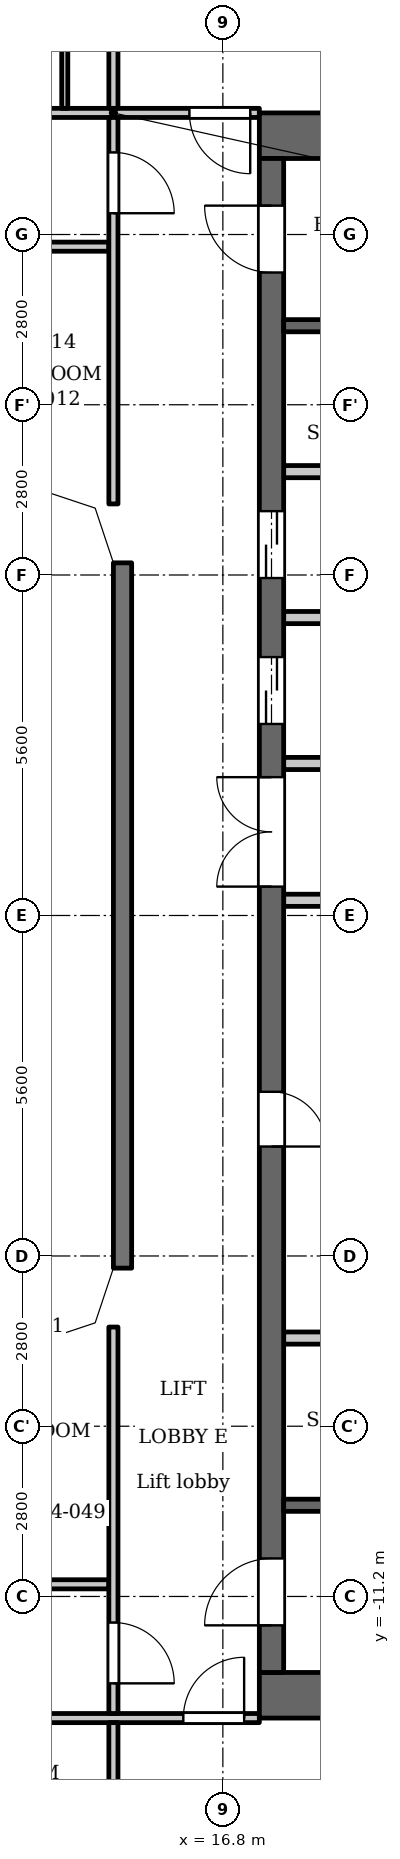
"""IFC4 building model, lengths in metres.
Left out: names, types, materials, properties, quantities, classifications, styles, units other than length and angle.
Written with IfcOpenShell. Run it as: python <this file> out.ifc"""

import sys

from ifc_helpers import new_model, si_unit, direction, frame, frame_2d, origin, place, context, subcontext, project, spatial, polyline, rectangle, outline, extrude, element, fill, save


model = new_model("IFC4")
c1 = context("Model", 3, precision=1e-05, world=origin(), true_north=direction((0.0, 1.0)))
c2 = subcontext(c1, "Body", "Model", "MODEL_VIEW")
j1 = project(units=[si_unit("LENGTHUNIT", "METRE"), si_unit("PLANEANGLEUNIT", "RADIAN")], contexts=[c1])
p1 = place(None, origin())
s1 = spatial("IfcSite", under=j1, at=p1, CompositionType="ELEMENT")
p2 = place(p1, origin())
s2 = spatial("IfcBuilding", under=s1, at=p2, CompositionType="ELEMENT")
p3 = place(p2, frame((0.0, 0.0, 171.1)))
s3 = spatial("IfcBuildingStorey", under=s2, at=p3, CompositionType="ELEMENT", Elevation=171.1)
p4 = place(p3, frame((15.15, 5.8, 0.0), z_axis=(0.0, 0.0, 1.0), x_axis=(0.0, -1.0, 0.0)))
e1 = element("IfcWall", 1, at=p4, inside=s3, PredefinedType="SOLIDWALL", context=c2, shape_type="SweptSolid", body=[
    extrude(rectangle(XDim=11.6, YDim=0.3, at=frame_2d((5.8, 0.0))), origin(), (0.0, 0.0, 1.0), 3.2),
])
for number, where, z_axis, x_axis in (
    (2, (17.4, 12.825, 0.0), (0.0, 0.0, 1.0), (1.0, 0.0, 0.0)),
    (3, (17.4, -12.825, 0.0), (0.0, 0.0, 1.0), (1.0, 0.0, 0.0)),
):
    element("IfcWall", number, at=place(p3, frame(where, z_axis=z_axis, x_axis=x_axis)), inside=s3, PredefinedType="SHEAR", context=c2, shape_type="SweptSolid", body=[
        extrude(rectangle(XDim=10.4, YDim=0.75, at=frame_2d((5.2, 0.0))), origin(), (0.0, 0.0, 1.0), 3.2),
    ])
p5 = place(p3, frame((17.6, -12.45, 0.0), z_axis=(0.0, 0.0, 1.0), x_axis=(0.0, 1.0, 0.0)))
e4 = element("IfcWall", 4, at=p5, inside=s3, PredefinedType="SHEAR", context=c2, shape_type="SweptSolid", body=[
    extrude(rectangle(XDim=24.9, YDim=0.4, at=frame_2d((12.45, 0.0))), origin(), (0.0, 0.0, 1.0), 3.2),
])
p6 = place(p5, frame((8.65, 0.0, 0.0)))
e5 = element("IfcOpeningElement", 5, at=p6, cuts=e4, PredefinedType="OPENING", context=c2, shape_type="SweptSolid", body=[
    extrude(rectangle(XDim=0.9, YDim=2.1, at=frame_2d((0.45, 1.05))), frame((0.0, 0.21, 0.0), z_axis=(0.0, -1.0, 0.0), x_axis=(1.0, 0.0, 0.0)), (0.0, 0.0, 1.0), 0.42),
])
p7 = place(p5, frame((15.6, 0.0, 0.0)))
e6 = element("IfcOpeningElement", 6, at=p7, cuts=e4, PredefinedType="OPENING", context=c2, shape_type="SweptSolid", body=[
    extrude(rectangle(XDim=1.1, YDim=2.1, at=frame_2d((0.55, 1.05))), frame((0.0, 0.21, 0.0), z_axis=(0.0, -1.0, 0.0), x_axis=(1.0, 0.0, 0.0)), (0.0, 0.0, 1.0), 0.42),
])
p8 = place(p5, frame((18.0, 0.0, 0.0)))
e7 = element("IfcOpeningElement", 7, at=p8, cuts=e4, PredefinedType="OPENING", context=c2, shape_type="SweptSolid", body=[
    extrude(rectangle(XDim=1.1, YDim=2.1, at=frame_2d((0.55, 1.05))), frame((0.0, 0.21, 0.0), z_axis=(0.0, -1.0, 0.0), x_axis=(1.0, 0.0, 0.0)), (0.0, 0.0, 1.0), 0.42),
])
p9 = place(p5, frame((23.025, 0.0, 0.0)))
e8 = element("IfcOpeningElement", 8, at=p9, cuts=e4, PredefinedType="OPENING", context=c2, shape_type="SweptSolid", body=[
    extrude(rectangle(XDim=1.1, YDim=2.1, at=frame_2d((0.55, 1.05))), frame((0.0, 0.21, 0.0), z_axis=(0.0, -1.0, 0.0), x_axis=(1.0, 0.0, 0.0)), (0.0, 0.0, 1.0), 0.42),
])
p10 = place(p5, frame((0.775, 0.0, 0.0)))
e9 = element("IfcOpeningElement", 9, at=p10, cuts=e4, PredefinedType="OPENING", context=c2, shape_type="SweptSolid", body=[
    extrude(rectangle(XDim=1.1, YDim=2.1, at=frame_2d((0.55, 1.05))), frame((0.0, 0.21, 0.0), z_axis=(0.0, -1.0, 0.0), x_axis=(1.0, 0.0, 0.0)), (0.0, 0.0, 1.0), 0.42),
])
p11 = place(p5, frame((12.925, 0.0, 0.0)))
e10 = element("IfcOpeningElement", 10, at=p11, cuts=e4, PredefinedType="OPENING", context=c2, shape_type="SweptSolid", body=[
    extrude(rectangle(XDim=1.8, YDim=2.1, at=frame_2d((0.9, 1.05))), frame((0.0, 0.21, 0.0), z_axis=(0.0, -1.0, 0.0), x_axis=(1.0, 0.0, 0.0)), (0.0, 0.0, 1.0), 0.42),
])
p12 = place(p3, frame((17.8, -9.7, 0.0), z_axis=(0.0, 0.0, 1.0), x_axis=(1.0, 0.0, 0.0)))
e11 = element("IfcWall", 11, at=p12, inside=s3, PredefinedType="SHEAR", context=c2, shape_type="SweptSolid", body=[
    extrude(rectangle(XDim=8.45, YDim=0.2, at=frame_2d((4.225, 0.0))), origin(), (0.0, 0.0, 1.0), 3.2),
])
p13 = place(p12, frame((0.85, 0.0, 0.0)))
e12 = element("IfcOpeningElement", 12, at=p13, cuts=e11, PredefinedType="OPENING", context=c2, shape_type="SweptSolid", body=[
    extrude(rectangle(XDim=1.1, YDim=2.1, at=frame_2d((0.55, 1.05))), frame((0.0, 0.11, 0.0), z_axis=(0.0, -1.0, 0.0), x_axis=(1.0, 0.0, 0.0)), (0.0, 0.0, 1.0), 0.22),
])
p14 = place(p12, frame((3.75, 0.0, 0.0)))
e13 = element("IfcOpeningElement", 13, at=p14, cuts=e11, PredefinedType="OPENING", context=c2, shape_type="SweptSolid", body=[
    extrude(rectangle(XDim=1.1, YDim=2.1, at=frame_2d((0.55, 1.05))), frame((0.0, 0.11, 0.0), z_axis=(0.0, -1.0, 0.0), x_axis=(1.0, 0.0, 0.0)), (0.0, 0.0, 1.0), 0.22),
])
p15 = place(p3, frame((17.8, -6.95, 0.0), z_axis=(0.0, 0.0, 1.0), x_axis=(1.0, 0.0, 0.0)))
e14 = element("IfcWall", 14, at=p15, inside=s3, PredefinedType="PARTITIONING", context=c2, shape_type="SweptSolid", body=[
    extrude(rectangle(XDim=2.8, YDim=0.2, at=frame_2d((1.4, 0.0))), origin(), (0.0, 0.0, 1.0), 3.2),
])
p16 = place(p3, frame((17.8, 0.25, 0.0), z_axis=(0.0, 0.0, 1.0), x_axis=(1.0, 0.0, 0.0)))
e15 = element("IfcWall", 15, at=p16, inside=s3, PredefinedType="PARTITIONING", context=c2, shape_type="SweptSolid", body=[
    extrude(rectangle(XDim=3.0, YDim=0.2, at=frame_2d((1.5, 0.0))), origin(), (0.0, 0.0, 1.0), 3.2),
])
p17 = place(p16, frame((1.98, 0.0, 0.0)))
e16 = element("IfcOpeningElement", 16, at=p17, cuts=e15, PredefinedType="OPENING", context=c2, shape_type="SweptSolid", body=[
    extrude(rectangle(XDim=0.9, YDim=2.1, at=frame_2d((0.45, 1.05))), frame((0.0, 0.11, 0.0), z_axis=(0.0, -1.0, 0.0), x_axis=(1.0, 0.0, 0.0)), (0.0, 0.0, 1.0), 0.22),
])
p18 = place(p3, frame((17.8, 2.5, 0.0), z_axis=(0.0, 0.0, 1.0), x_axis=(1.0, 0.0, 0.0)))
e17 = element("IfcWall", 17, at=p18, inside=s3, PredefinedType="PARTITIONING", context=c2, shape_type="SweptSolid", body=[
    extrude(rectangle(XDim=3.0, YDim=0.2, at=frame_2d((1.5, 0.0))), origin(), (0.0, 0.0, 1.0), 3.2),
])
for number, where, z_axis, x_axis in (
    (18, (17.8, 4.9, 0.0), (0.0, 0.0, 1.0), (1.0, 0.0, 0.0)),
    (19, (17.8, 7.3, 0.0), (0.0, 0.0, 1.0), (1.0, 0.0, 0.0)),
):
    element("IfcWall", number, at=place(p3, frame(where, z_axis=z_axis, x_axis=x_axis)), inside=s3, PredefinedType="PARTITIONING", context=c2, shape_type="SweptSolid", body=[
        extrude(rectangle(XDim=2.8, YDim=0.2, at=frame_2d((1.4, 0.0))), origin(), (0.0, 0.0, 1.0), 3.2),
    ])
p19 = place(p3, frame((17.8, 9.7, 0.0), z_axis=(0.0, 0.0, 1.0), x_axis=(1.0, 0.0, 0.0)))
e20 = element("IfcWall", 20, at=p19, inside=s3, PredefinedType="SHEAR", context=c2, shape_type="SweptSolid", body=[
    extrude(rectangle(XDim=8.45, YDim=0.2, at=frame_2d((4.225, 0.0))), origin(), (0.0, 0.0, 1.0), 3.2),
])
p20 = place(p19, frame((0.85, 0.0, 0.0)))
e21 = element("IfcOpeningElement", 21, at=p20, cuts=e20, PredefinedType="OPENING", context=c2, shape_type="SweptSolid", body=[
    extrude(rectangle(XDim=1.1, YDim=2.1, at=frame_2d((0.55, 1.05))), frame((0.0, 0.11, 0.0), z_axis=(0.0, -1.0, 0.0), x_axis=(1.0, 0.0, 0.0)), (0.0, 0.0, 1.0), 0.22),
])
p21 = place(p19, frame((3.75, 0.0, 0.0)))
e22 = element("IfcOpeningElement", 22, at=p21, cuts=e20, PredefinedType="OPENING", context=c2, shape_type="SweptSolid", body=[
    extrude(rectangle(XDim=1.1, YDim=2.1, at=frame_2d((0.55, 1.05))), frame((0.0, 0.11, 0.0), z_axis=(0.0, -1.0, 0.0), x_axis=(1.0, 0.0, 0.0)), (0.0, 0.0, 1.0), 0.22),
])
p22 = place(p3, frame((-17.4, -13.2, 0.0), z_axis=(0.0, 0.0, 1.0), x_axis=(1.0, 0.0, 0.0)))
e23 = element("IfcWall", 23, at=p22, inside=s3, PredefinedType="PARTITIONING", context=c2, shape_type="SweptSolid", body=[
    extrude(rectangle(XDim=34.8, YDim=0.15, at=frame_2d((17.4, 0.0))), origin(), (0.0, 0.0, 1.0), 3.2),
])
p23 = place(p22, frame((0.15, 0.0, 0.0)))
e24 = element("IfcOpeningElement", 24, at=p23, cuts=e23, PredefinedType="OPENING", context=c2, shape_type="SweptSolid", body=[
    extrude(rectangle(XDim=1.0, YDim=2.1, at=frame_2d((0.5, 1.05))), frame((0.0, 0.085, 0.0), z_axis=(0.0, -1.0, 0.0), x_axis=(1.0, 0.0, 0.0)), (0.0, 0.0, 1.0), 0.17),
])
p24 = place(p22, frame((33.55, 0.0, 0.0)))
e25 = element("IfcOpeningElement", 25, at=p24, cuts=e23, PredefinedType="OPENING", context=c2, shape_type="SweptSolid", body=[
    extrude(rectangle(XDim=1.0, YDim=2.1, at=frame_2d((0.5, 1.05))), frame((0.0, 0.085, 0.0), z_axis=(0.0, -1.0, 0.0), x_axis=(1.0, 0.0, 0.0)), (0.0, 0.0, 1.0), 0.17),
])
p25 = place(p22, frame((15.7, 0.0, 0.0)))
e26 = element("IfcOpeningElement", 26, at=p25, cuts=e23, PredefinedType="OPENING", context=c2, shape_type="SweptSolid", body=[
    extrude(rectangle(XDim=1.0, YDim=2.1, at=frame_2d((0.5, 1.05))), frame((0.0, 0.085, 0.0), z_axis=(0.0, -1.0, 0.0), x_axis=(1.0, 0.0, 0.0)), (0.0, 0.0, 1.0), 0.17),
])
p26 = place(p22, frame((26.9, 0.0, 0.0)))
e27 = element("IfcOpeningElement", 27, at=p26, cuts=e23, PredefinedType="OPENING", context=c2, shape_type="SweptSolid", body=[
    extrude(rectangle(XDim=1.0, YDim=2.1, at=frame_2d((0.5, 1.05))), frame((0.0, 0.085, 0.0), z_axis=(0.0, -1.0, 0.0), x_axis=(1.0, 0.0, 0.0)), (0.0, 0.0, 1.0), 0.17),
])
p27 = place(p3, frame((-14.925, -11.0, 0.0), z_axis=(0.0, 0.0, 1.0), x_axis=(1.0, 0.0, 0.0)))
e28 = element("IfcWall", 28, at=p27, inside=s3, PredefinedType="PARTITIONING", context=c2, shape_type="SweptSolid", body=[
    extrude(rectangle(XDim=29.85, YDim=0.15, at=frame_2d((14.925, 0.0))), origin(), (0.0, 0.0, 1.0), 3.2),
])
p28 = place(p27, frame((9.875, 0.0, 0.0)))
e29 = element("IfcOpeningElement", 29, at=p28, cuts=e28, PredefinedType="OPENING", context=c2, shape_type="SweptSolid", body=[
    extrude(rectangle(XDim=1.0, YDim=2.1, at=frame_2d((0.5, 1.05))), frame((0.0, 0.085, 0.0), z_axis=(0.0, -1.0, 0.0), x_axis=(1.0, 0.0, 0.0)), (0.0, 0.0, 1.0), 0.17),
])
p29 = place(p27, frame((17.875, 0.0, 0.0)))
e30 = element("IfcOpeningElement", 30, at=p29, cuts=e28, PredefinedType="OPENING", context=c2, shape_type="SweptSolid", body=[
    extrude(rectangle(XDim=1.0, YDim=2.1, at=frame_2d((0.5, 1.05))), frame((0.0, 0.085, 0.0), z_axis=(0.0, -1.0, 0.0), x_axis=(1.0, 0.0, 0.0)), (0.0, 0.0, 1.0), 0.17),
])
p30 = place(p3, frame((-14.925, 11.0, 0.0), z_axis=(0.0, 0.0, 1.0), x_axis=(1.0, 0.0, 0.0)))
e31 = element("IfcWall", 31, at=p30, inside=s3, PredefinedType="PARTITIONING", context=c2, shape_type="SweptSolid", body=[
    extrude(rectangle(XDim=29.85, YDim=0.15, at=frame_2d((14.925, 0.0))), origin(), (0.0, 0.0, 1.0), 3.2),
])
p31 = place(p30, frame((2.475, 0.0, 0.0)))
e32 = element("IfcOpeningElement", 32, at=p31, cuts=e31, PredefinedType="OPENING", context=c2, shape_type="SweptSolid", body=[
    extrude(rectangle(XDim=1.0, YDim=2.1, at=frame_2d((0.5, 1.05))), frame((0.0, 0.085, 0.0), z_axis=(0.0, -1.0, 0.0), x_axis=(1.0, 0.0, 0.0)), (0.0, 0.0, 1.0), 0.17),
])
p32 = place(p30, frame((26.275, 0.0, 0.0)))
e33 = element("IfcOpeningElement", 33, at=p32, cuts=e31, PredefinedType="OPENING", context=c2, shape_type="SweptSolid", body=[
    extrude(rectangle(XDim=1.0, YDim=2.1, at=frame_2d((0.5, 1.05))), frame((0.0, 0.085, 0.0), z_axis=(0.0, -1.0, 0.0), x_axis=(1.0, 0.0, 0.0)), (0.0, 0.0, 1.0), 0.17),
])
p33 = place(p3, frame((-17.4, 13.2, 0.0), z_axis=(0.0, 0.0, 1.0), x_axis=(1.0, 0.0, 0.0)))
e34 = element("IfcWall", 34, at=p33, inside=s3, PredefinedType="PARTITIONING", context=c2, shape_type="SweptSolid", body=[
    extrude(rectangle(XDim=34.8, YDim=0.15, at=frame_2d((17.4, 0.0))), origin(), (0.0, 0.0, 1.0), 3.2),
])
p34 = place(p33, frame((0.25, 0.0, 0.0)))
e35 = element("IfcOpeningElement", 35, at=p34, cuts=e34, PredefinedType="OPENING", context=c2, shape_type="SweptSolid", body=[
    extrude(rectangle(XDim=1.0, YDim=2.1, at=frame_2d((0.5, 1.05))), frame((0.0, 0.085, 0.0), z_axis=(0.0, -1.0, 0.0), x_axis=(1.0, 0.0, 0.0)), (0.0, 0.0, 1.0), 0.17),
])
p35 = place(p33, frame((33.65, 0.0, 0.0)))
e36 = element("IfcOpeningElement", 36, at=p35, cuts=e34, PredefinedType="OPENING", context=c2, shape_type="SweptSolid", body=[
    extrude(rectangle(XDim=1.0, YDim=2.1, at=frame_2d((0.5, 1.05))), frame((0.0, 0.085, 0.0), z_axis=(0.0, -1.0, 0.0), x_axis=(1.0, 0.0, 0.0)), (0.0, 0.0, 1.0), 0.17),
])
p36 = place(p33, frame((10.15, 0.0, 0.0)))
e37 = element("IfcOpeningElement", 37, at=p36, cuts=e34, PredefinedType="OPENING", context=c2, shape_type="SweptSolid", body=[
    extrude(rectangle(XDim=1.0, YDim=2.1, at=frame_2d((0.5, 1.05))), frame((0.0, 0.085, 0.0), z_axis=(0.0, -1.0, 0.0), x_axis=(1.0, 0.0, 0.0)), (0.0, 0.0, 1.0), 0.17),
])
p37 = place(p33, frame((15.75, 0.0, 0.0)))
e38 = element("IfcOpeningElement", 38, at=p37, cuts=e34, PredefinedType="OPENING", context=c2, shape_type="SweptSolid", body=[
    extrude(rectangle(XDim=1.0, YDim=2.1, at=frame_2d((0.5, 1.05))), frame((0.0, 0.085, 0.0), z_axis=(0.0, -1.0, 0.0), x_axis=(1.0, 0.0, 0.0)), (0.0, 0.0, 1.0), 0.17),
])
p38 = place(p33, frame((24.95, 0.0, 0.0)))
e39 = element("IfcOpeningElement", 39, at=p38, cuts=e34, PredefinedType="OPENING", context=c2, shape_type="SweptSolid", body=[
    extrude(rectangle(XDim=1.0, YDim=2.1, at=frame_2d((0.5, 1.05))), frame((0.0, 0.085, 0.0), z_axis=(0.0, -1.0, 0.0), x_axis=(1.0, 0.0, 0.0)), (0.0, 0.0, 1.0), 0.17),
])
p39 = place(p33, frame((29.95, 0.0, 0.0)))
e40 = element("IfcOpeningElement", 40, at=p39, cuts=e34, PredefinedType="OPENING", context=c2, shape_type="SweptSolid", body=[
    extrude(rectangle(XDim=1.0, YDim=2.1, at=frame_2d((0.5, 1.05))), frame((0.0, 0.085, 0.0), z_axis=(0.0, -1.0, 0.0), x_axis=(1.0, 0.0, 0.0)), (0.0, 0.0, 1.0), 0.17),
])
p40 = place(p3, frame((14.2, 13.275, 0.0), z_axis=(0.0, 0.0, 1.0), x_axis=(0.0, 1.0, 0.0)))
e41 = element("IfcWall", 41, at=p40, inside=s3, PredefinedType="PARTITIONING", context=c2, shape_type="SweptSolid", body=[
    extrude(rectangle(XDim=3.175, YDim=0.1, at=frame_2d((1.587, 0.0))), origin(), (0.0, 0.0, 1.0), 3.2),
])
p41 = place(p3, frame((15.0, -15.325, 0.0), z_axis=(0.0, 0.0, 1.0), x_axis=(0.0, 1.0, 0.0)))
e42 = element("IfcWall", 42, at=p41, inside=s3, PredefinedType="PARTITIONING", context=c2, shape_type="SweptSolid", body=[
    extrude(rectangle(XDim=2.05, YDim=0.15, at=frame_2d((1.025, 0.0))), origin(), (0.0, 0.0, 1.0), 3.2),
])
p42 = place(p3, frame((15.0, -13.125, 0.0), z_axis=(0.0, 0.0, 1.0), x_axis=(0.0, 1.0, 0.0)))
e43 = element("IfcWall", 43, at=p42, inside=s3, PredefinedType="PARTITIONING", context=c2, shape_type="SweptSolid", body=[
    extrude(rectangle(XDim=6.356, YDim=0.15, at=frame_2d((3.178, 0.0))), origin(), (0.0, 0.0, 1.0), 3.2),
])
p43 = place(p42, frame((0.496, 0.0, 0.0)))
e44 = element("IfcOpeningElement", 44, at=p43, cuts=e43, PredefinedType="OPENING", context=c2, shape_type="SweptSolid", body=[
    extrude(rectangle(XDim=1.0, YDim=2.1, at=frame_2d((0.5, 1.05))), frame((0.0, 0.085, 0.0), z_axis=(0.0, -1.0, 0.0), x_axis=(1.0, 0.0, 0.0)), (0.0, 0.0, 1.0), 0.17),
])
p44 = place(p3, frame((15.0, 6.769, 0.0), z_axis=(0.0, 0.0, 1.0), x_axis=(0.0, 1.0, 0.0)))
e45 = element("IfcWall", 45, at=p44, inside=s3, PredefinedType="PARTITIONING", context=c2, shape_type="SweptSolid", body=[
    extrude(rectangle(XDim=6.356, YDim=0.15, at=frame_2d((3.178, 0.0))), origin(), (0.0, 0.0, 1.0), 3.2),
])
p45 = place(p44, frame((4.781, 0.0, 0.0)))
e46 = element("IfcOpeningElement", 46, at=p45, cuts=e45, PredefinedType="OPENING", context=c2, shape_type="SweptSolid", body=[
    extrude(rectangle(XDim=1.0, YDim=2.1, at=frame_2d((0.5, 1.05))), frame((0.0, 0.085, 0.0), z_axis=(0.0, -1.0, 0.0), x_axis=(1.0, 0.0, 0.0)), (0.0, 0.0, 1.0), 0.17),
])
p46 = place(p3, frame((15.0, 13.275, 0.0), z_axis=(0.0, 0.0, 1.0), x_axis=(0.0, 1.0, 0.0)))
e47 = element("IfcWall", 47, at=p46, inside=s3, PredefinedType="PARTITIONING", context=c2, shape_type="SweptSolid", body=[
    extrude(rectangle(XDim=2.05, YDim=0.15, at=frame_2d((1.025, 0.0))), origin(), (0.0, 0.0, 1.0), 3.2),
])
p47 = place(p3, origin())
e48 = element("IfcWall", 48, at=p47, inside=s3, PredefinedType="SOLIDWALL", context=c2, shape_type="SweptSolid", body=[
    extrude(outline(polyline([(14.937, 6.937), (13.849, 7.3), (13.8, 7.3), (13.8, 7.0), (14.7, 6.7), (15.0, 5.8), (15.3, 5.8), (15.3, 5.849), (14.937, 6.937)])), origin(), (0.0, 0.0, 1.0), 3.2),
])
e49 = element("IfcWall", 49, at=p47, inside=s3, PredefinedType="SOLIDWALL", context=c2, shape_type="SweptSolid", body=[
    extrude(outline(polyline([(14.937, -6.937), (15.3, -5.849), (15.3, -5.8), (15.0, -5.8), (14.7, -6.7), (13.8, -7.0), (13.8, -7.3), (13.849, -7.3), (14.937, -6.937)])), origin(), (0.0, 0.0, 1.0), 3.2),
])
p48 = place(p6, origin())
e50 = element("IfcDoor", 50, at=p48, inside=s3, OperationType="SINGLE_SWING_LEFT", PredefinedType="DOOR", context=c2, shape_type="SweptSolid", body=[
    extrude(rectangle(XDim=0.9, YDim=2.1, at=frame_2d((0.45, 1.05))), frame((0.0, 0.025, 0.0), z_axis=(0.0, -1.0, 0.0), x_axis=(1.0, 0.0, 0.0)), (0.0, 0.0, 1.0), 0.05),
])
fill(e5, e50)
p49 = place(p7, origin())
e51 = element("IfcDoor", 51, at=p49, inside=s3, OperationType="DOUBLE_DOOR_SLIDING", PredefinedType="DOOR", context=c2, shape_type="SweptSolid", body=[
    extrude(rectangle(XDim=1.1, YDim=2.1, at=frame_2d((0.55, 1.05))), frame((0.0, 0.025, 0.0), z_axis=(0.0, -1.0, 0.0), x_axis=(1.0, 0.0, 0.0)), (0.0, 0.0, 1.0), 0.05),
])
fill(e6, e51)
p50 = place(p8, origin())
e52 = element("IfcDoor", 52, at=p50, inside=s3, OperationType="DOUBLE_DOOR_SLIDING", PredefinedType="DOOR", context=c2, shape_type="SweptSolid", body=[
    extrude(rectangle(XDim=1.1, YDim=2.1, at=frame_2d((0.55, 1.05))), frame((0.0, 0.025, 0.0), z_axis=(0.0, -1.0, 0.0), x_axis=(1.0, 0.0, 0.0)), (0.0, 0.0, 1.0), 0.05),
])
fill(e7, e52)
p51 = place(p9, origin())
e53 = element("IfcDoor", 53, at=p51, inside=s3, OperationType="SINGLE_SWING_LEFT", PredefinedType="DOOR", context=c2, shape_type="SweptSolid", body=[
    extrude(rectangle(XDim=1.1, YDim=2.1, at=frame_2d((0.55, 1.05))), frame((0.0, 0.025, 0.0), z_axis=(0.0, -1.0, 0.0), x_axis=(1.0, 0.0, 0.0)), (0.0, 0.0, 1.0), 0.05),
])
fill(e8, e53)
p52 = place(p10, origin())
e54 = element("IfcDoor", 54, at=p52, inside=s3, OperationType="SINGLE_SWING_RIGHT", PredefinedType="DOOR", context=c2, shape_type="SweptSolid", body=[
    extrude(rectangle(XDim=1.1, YDim=2.1, at=frame_2d((0.55, 1.05))), frame((0.0, 0.025, 0.0), z_axis=(0.0, -1.0, 0.0), x_axis=(1.0, 0.0, 0.0)), (0.0, 0.0, 1.0), 0.05),
])
fill(e9, e54)
p53 = place(p11, origin())
e55 = element("IfcDoor", 55, at=p53, inside=s3, OperationType="DOUBLE_DOOR_SINGLE_SWING", PredefinedType="DOOR", context=c2, shape_type="SweptSolid", body=[
    extrude(rectangle(XDim=1.8, YDim=2.1, at=frame_2d((0.9, 1.05))), frame((0.0, 0.025, 0.0), z_axis=(0.0, -1.0, 0.0), x_axis=(1.0, 0.0, 0.0)), (0.0, 0.0, 1.0), 0.05),
])
fill(e10, e55)
p54 = place(p45, origin())
e56 = element("IfcDoor", 56, at=p54, inside=s3, OperationType="SINGLE_SWING_LEFT", PredefinedType="DOOR", context=c2, shape_type="SweptSolid", body=[
    extrude(rectangle(XDim=1.0, YDim=2.1, at=frame_2d((0.5, 1.05))), frame((0.0, 0.025, 0.0), z_axis=(0.0, -1.0, 0.0), x_axis=(1.0, 0.0, 0.0)), (0.0, 0.0, 1.0), 0.05),
])
fill(e46, e56)
p55 = place(p35, origin())
e57 = element("IfcDoor", 57, at=p55, inside=s3, OperationType="SINGLE_SWING_RIGHT", PredefinedType="DOOR", context=c2, shape_type="SweptSolid", body=[
    extrude(rectangle(XDim=1.0, YDim=2.1, at=frame_2d((0.5, 1.05))), frame((0.0, 0.025, 0.0), z_axis=(0.0, -1.0, 0.0), x_axis=(1.0, 0.0, 0.0)), (0.0, 0.0, 1.0), 0.05),
])
fill(e36, e57)
p56 = place(p43, origin())
e58 = element("IfcDoor", 58, at=p56, inside=s3, OperationType="SINGLE_SWING_LEFT", PredefinedType="DOOR", context=c2, shape_type="SweptSolid", body=[
    extrude(rectangle(XDim=1.0, YDim=2.1, at=frame_2d((0.5, 1.05))), frame((0.0, 0.025, 0.0), z_axis=(0.0, -1.0, 0.0), x_axis=(1.0, 0.0, 0.0)), (0.0, 0.0, 1.0), 0.05),
])
fill(e44, e58)
p57 = place(p24, origin())
e59 = element("IfcDoor", 59, at=p57, inside=s3, OperationType="SINGLE_SWING_LEFT", PredefinedType="DOOR", context=c2, shape_type="SweptSolid", body=[
    extrude(rectangle(XDim=1.0, YDim=2.1, at=frame_2d((0.5, 1.05))), frame((0.0, 0.025, 0.0), z_axis=(0.0, -1.0, 0.0), x_axis=(1.0, 0.0, 0.0)), (0.0, 0.0, 1.0), 0.05),
])
fill(e25, e59)
save(model, sys.argv[1])
